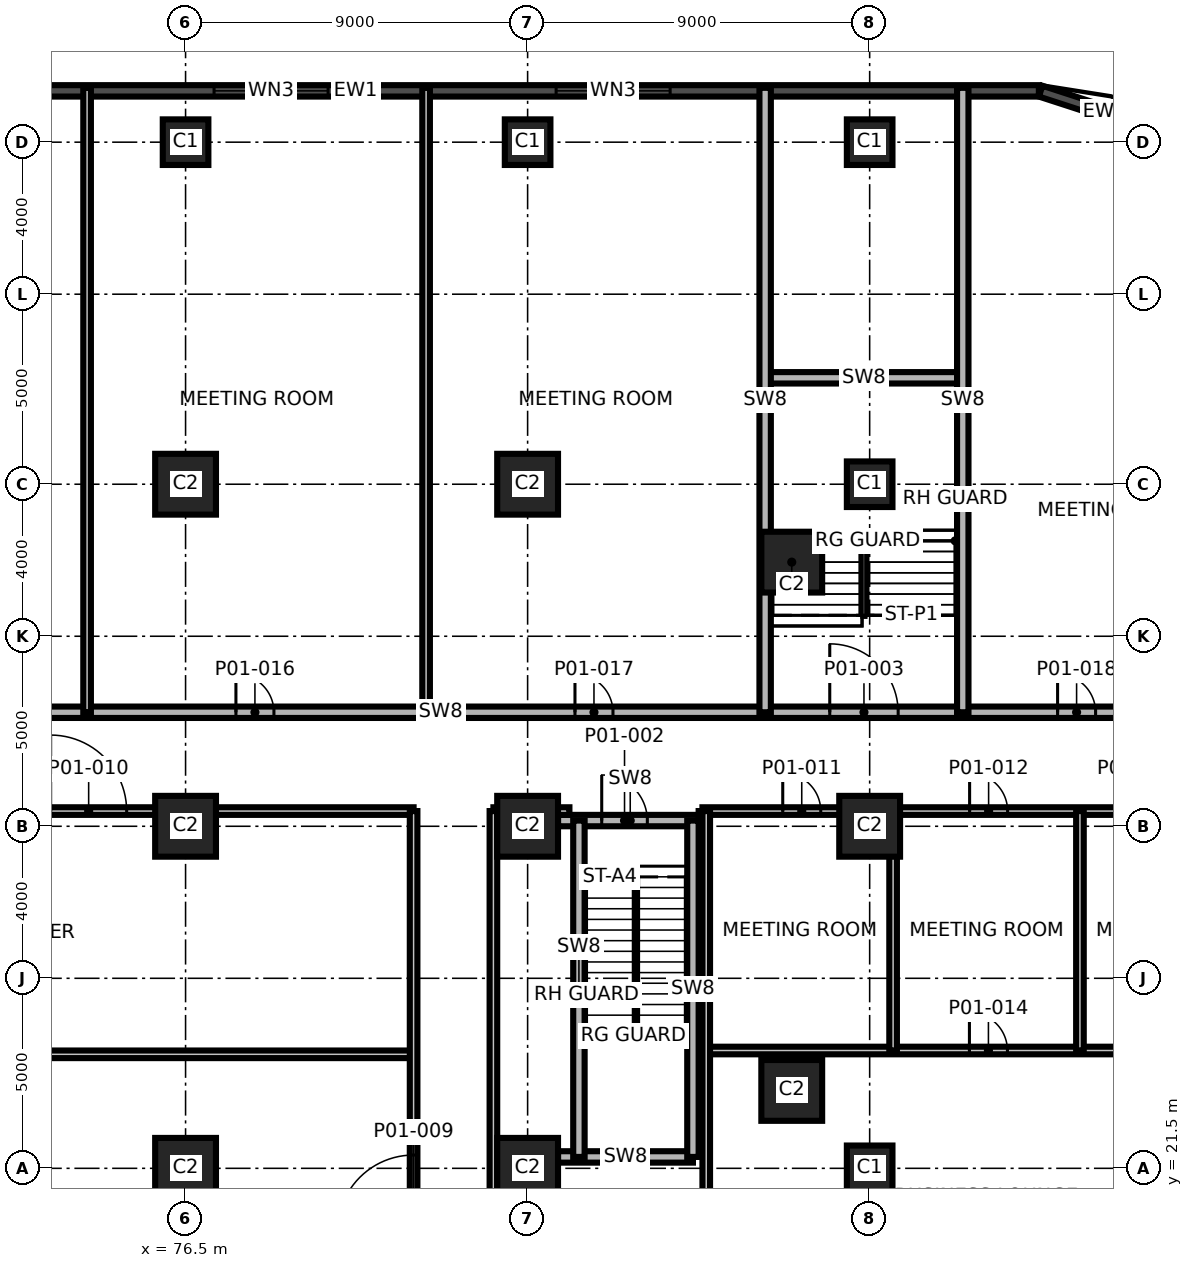
"""IFC4 building model, lengths in metres.
Left out: names, types, materials, properties, quantities, classifications, styles, units other than length and angle.
Written with IfcOpenShell. Run it as: python <this file> out.ifc"""

import sys

from ifc_helpers import new_model, si_unit, direction, frame, frame_2d, origin, origin_2d, place, context, subcontext, project, spatial, rectangle, extrude, element, fill, save


model = new_model("IFC4")
c1 = context("Model", 3, precision=1e-05, world=origin(), true_north=direction((0.0, 1.0)))
c2 = subcontext(c1, "Body", "Model", "MODEL_VIEW")
j1 = project(units=[si_unit("LENGTHUNIT", "METRE"), si_unit("PLANEANGLEUNIT", "RADIAN")], contexts=[c1])
p1 = place(None, origin())
s1 = spatial("IfcSite", under=j1, at=p1, CompositionType="ELEMENT")
p2 = place(p1, origin())
s2 = spatial("IfcBuilding", under=s1, at=p2, CompositionType="ELEMENT")
p3 = place(p2, frame((0.0, 0.0, 8.0)))
s3 = spatial("IfcBuildingStorey", under=s2, at=p3, CompositionType="ELEMENT", Elevation=8.0)
for number, where, z_axis, x_axis in (
    (1, (76.5, 21.5, 0.0), (0.0, 0.0, 1.0), (1.0, 0.0, 0.0)),
    (2, (85.5, 21.5, 0.0), (0.0, 0.0, 1.0), (1.0, 0.0, 0.0)),
):
    element("IfcColumn", number, at=place(p3, frame(where, z_axis=z_axis, x_axis=x_axis)), inside=s3, PredefinedType="COLUMN", context=c2, shape_type="SweptSolid", body=[
        extrude(rectangle(XDim=1.6, YDim=1.6, at=origin_2d()), origin(), (0.0, 0.0, 1.0), 5.5),
    ])
p4 = place(p3, frame((94.5, 21.5, 0.0), z_axis=(0.0, 0.0, 1.0), x_axis=(1.0, 0.0, 0.0)))
e3 = element("IfcColumn", 3, at=p4, inside=s3, PredefinedType="COLUMN", context=c2, shape_type="SweptSolid", body=[
    extrude(rectangle(XDim=1.2, YDim=1.2, at=origin_2d()), origin(), (0.0, 0.0, 1.0), 5.5),
])
for number, where, z_axis, x_axis in (
    (4, (76.5, 30.5, 0.0), (0.0, 0.0, 1.0), (1.0, 0.0, 0.0)),
    (5, (85.5, 30.5, 0.0), (0.0, 0.0, 1.0), (1.0, 0.0, 0.0)),
    (6, (94.5, 30.5, 0.0), (0.0, 0.0, 1.0), (1.0, 0.0, 0.0)),
    (7, (76.5, 39.5, 0.0), (0.0, 0.0, 1.0), (1.0, 0.0, 0.0)),
    (8, (85.5, 39.5, 0.0), (0.0, 0.0, 1.0), (1.0, 0.0, 0.0)),
):
    element("IfcColumn", number, at=place(p3, frame(where, z_axis=z_axis, x_axis=x_axis)), inside=s3, PredefinedType="COLUMN", context=c2, shape_type="SweptSolid", body=[
        extrude(rectangle(XDim=1.6, YDim=1.6, at=origin_2d()), origin(), (0.0, 0.0, 1.0), 5.5),
    ])
for number, where, z_axis, x_axis in (
    (9, (94.5, 39.5, 0.0), (0.0, 0.0, 1.0), (1.0, 0.0, 0.0)),
    (10, (76.5, 48.5, 0.0), (0.0, 0.0, 1.0), (1.0, 0.0, 0.0)),
    (11, (85.5, 48.5, 0.0), (0.0, 0.0, 1.0), (1.0, 0.0, 0.0)),
    (12, (94.5, 48.5, 0.0), (0.0, 0.0, 1.0), (1.0, 0.0, 0.0)),
):
    element("IfcColumn", number, at=place(p3, frame(where, z_axis=z_axis, x_axis=x_axis)), inside=s3, PredefinedType="COLUMN", context=c2, shape_type="SweptSolid", body=[
        extrude(rectangle(XDim=1.2, YDim=1.2, at=origin_2d()), origin(), (0.0, 0.0, 1.0), 5.5),
    ])
for number, where, z_axis, x_axis in (
    (13, (92.45, 23.55, 0.0), (0.0, 0.0, 1.0), (1.0, 0.0, 0.0)),
    (14, (92.45, 37.45, 0.0), (0.0, 0.0, 1.0), (1.0, 0.0, 0.0)),
):
    element("IfcColumn", number, at=place(p3, frame(where, z_axis=z_axis, x_axis=x_axis)), inside=s3, PredefinedType="COLUMN", context=c2, shape_type="SweptSolid", body=[
        extrude(rectangle(XDim=1.6, YDim=1.6, at=origin_2d()), origin(), (0.0, 0.0, 1.0), 5.5),
    ])
p5 = place(p3, frame((102.362, 48.75, 0.0), z_axis=(0.0, 0.0, 1.0), x_axis=(-0.951038127287, 0.309073584194, 0.0)))
e15 = element("IfcWall", 15, at=p5, inside=s3, PredefinedType="SOLIDWALL", context=c2, shape_type="SweptSolid", body=[
    extrude(rectangle(XDim=3.536, YDim=0.3, at=frame_2d((1.768, 0.0))), origin(), (0.0, 0.0, 1.0), 5.2),
])
p6 = place(p3, frame((98.952, 49.85, 0.0), z_axis=(0.0, 0.0, 1.0), x_axis=(-1.0, 0.0, 0.0)))
e16 = element("IfcWall", 16, at=p6, inside=s3, PredefinedType="SOLIDWALL", context=c2, shape_type="SweptSolid", body=[
    extrude(rectangle(XDim=35.952, YDim=0.3, at=frame_2d((17.976, 0.0))), origin(), (0.0, 0.0, 1.0), 5.2),
])
p7 = place(p6, frame((9.702, 0.0, 0.9)))
e17 = element("IfcOpeningElement", 17, at=p7, cuts=e16, PredefinedType="OPENING", context=c2, shape_type="SweptSolid", body=[
    extrude(rectangle(XDim=3.0, YDim=2.4, at=frame_2d((1.5, 1.2))), frame((0.0, 0.16, 0.0), z_axis=(0.0, -1.0, 0.0), x_axis=(1.0, 0.0, 0.0)), (0.0, 0.0, 1.0), 0.32),
])
p8 = place(p6, frame((18.702, 0.0, 0.9)))
e18 = element("IfcOpeningElement", 18, at=p8, cuts=e16, PredefinedType="OPENING", context=c2, shape_type="SweptSolid", body=[
    extrude(rectangle(XDim=3.0, YDim=2.4, at=frame_2d((1.5, 1.2))), frame((0.0, 0.16, 0.0), z_axis=(0.0, -1.0, 0.0), x_axis=(1.0, 0.0, 0.0)), (0.0, 0.0, 1.0), 0.32),
])
p9 = place(p6, frame((27.702, 0.0, 0.9)))
e19 = element("IfcOpeningElement", 19, at=p9, cuts=e16, PredefinedType="OPENING", context=c2, shape_type="SweptSolid", body=[
    extrude(rectangle(XDim=3.0, YDim=2.4, at=frame_2d((1.5, 1.2))), frame((0.0, 0.16, 0.0), z_axis=(0.0, -1.0, 0.0), x_axis=(1.0, 0.0, 0.0)), (0.0, 0.0, 1.0), 0.32),
])
p10 = place(p6, frame((32.226, 0.0, 0.9)))
e20 = element("IfcOpeningElement", 20, at=p10, cuts=e16, PredefinedType="OPENING", context=c2, shape_type="SweptSolid", body=[
    extrude(rectangle(XDim=3.0, YDim=2.4, at=frame_2d((1.5, 1.2))), frame((0.0, 0.16, 0.0), z_axis=(0.0, -1.0, 0.0), x_axis=(1.0, 0.0, 0.0)), (0.0, 0.0, 1.0), 0.32),
])
p11 = place(p3, frame((86.3, 21.8, 0.0), z_axis=(0.0, 0.0, 1.0), x_axis=(1.0, 0.0, 0.0)))
e21 = element("IfcWall", 21, at=p11, inside=s3, PredefinedType="SHEAR", context=c2, shape_type="SweptSolid", body=[
    extrude(rectangle(XDim=3.55, YDim=0.3, at=frame_2d((1.775, 0.0))), origin(), (0.0, 0.0, 1.0), 5.2),
])
p12 = place(p3, frame((59.05, 24.5, 0.0), z_axis=(0.0, 0.0, 1.0), x_axis=(1.0, 0.0, 0.0)))
e22 = element("IfcWall", 22, at=p12, inside=s3, PredefinedType="PARTITIONING", context=c2, shape_type="SweptSolid", body=[
    extrude(rectangle(XDim=23.45, YDim=0.2, at=frame_2d((11.725, 0.0))), origin(), (0.0, 0.0, 1.0), 5.2),
])
p13 = place(p12, frame((10.8, 0.0, 0.0)))
e23 = element("IfcOpeningElement", 23, at=p13, cuts=e22, PredefinedType="OPENING", context=c2, shape_type="SweptSolid", body=[
    extrude(rectangle(XDim=2.0, YDim=2.1, at=frame_2d((1.0, 1.05))), frame((0.0, 0.11, 0.0), z_axis=(0.0, -1.0, 0.0), x_axis=(1.0, 0.0, 0.0)), (0.0, 0.0, 1.0), 0.22),
])
p14 = place(p3, frame((90.2, 24.6, 0.0), z_axis=(0.0, 0.0, 1.0), x_axis=(1.0, 0.0, 0.0)))
e24 = element("IfcWall", 24, at=p14, inside=s3, PredefinedType="PARTITIONING", context=c2, shape_type="SweptSolid", body=[
    extrude(rectangle(XDim=14.73, YDim=0.2, at=frame_2d((7.365, 0.0))), origin(), (0.0, 0.0, 1.0), 5.2),
])
p15 = place(p14, frame((6.925, 0.0, 0.0)))
e25 = element("IfcOpeningElement", 25, at=p15, cuts=e24, PredefinedType="OPENING", context=c2, shape_type="SweptSolid", body=[
    extrude(rectangle(XDim=1.0, YDim=2.1, at=frame_2d((0.5, 1.05))), frame((0.0, 0.11, 0.0), z_axis=(0.0, -1.0, 0.0), x_axis=(1.0, 0.0, 0.0)), (0.0, 0.0, 1.0), 0.22),
])
p16 = place(p3, frame((86.3, 30.65, 0.0), z_axis=(0.0, 0.0, 1.0), x_axis=(1.0, 0.0, 0.0)))
e26 = element("IfcWall", 26, at=p16, inside=s3, PredefinedType="SHEAR", context=c2, shape_type="SweptSolid", body=[
    extrude(rectangle(XDim=3.8, YDim=0.3, at=frame_2d((1.9, 0.0))), origin(), (0.0, 0.0, 1.0), 5.2),
])
p17 = place(p16, frame((1.15, 0.0, 0.0)))
e27 = element("IfcOpeningElement", 27, at=p17, cuts=e26, PredefinedType="OPENING", context=c2, shape_type="SweptSolid", body=[
    extrude(rectangle(XDim=1.2, YDim=2.1, at=frame_2d((0.6, 1.05))), frame((0.0, 0.16, 0.0), z_axis=(0.0, -1.0, 0.0), x_axis=(1.0, 0.0, 0.0)), (0.0, 0.0, 1.0), 0.32),
])
p18 = place(p3, frame((58.97, 30.9, 0.0), z_axis=(0.0, 0.0, 1.0), x_axis=(1.0, 0.0, 0.0)))
e28 = element("IfcWall", 28, at=p18, inside=s3, PredefinedType="PARTITIONING", context=c2, shape_type="SweptSolid", body=[
    extrude(rectangle(XDim=23.53, YDim=0.2, at=frame_2d((11.765, 0.0))), origin(), (0.0, 0.0, 1.0), 5.2),
])
p19 = place(p18, frame((13.98, 0.0, 0.0)))
e29 = element("IfcOpeningElement", 29, at=p19, cuts=e28, PredefinedType="OPENING", context=c2, shape_type="SweptSolid", body=[
    extrude(rectangle(XDim=2.0, YDim=2.4, at=frame_2d((1.0, 1.2))), frame((0.0, 0.11, 0.0), z_axis=(0.0, -1.0, 0.0), x_axis=(1.0, 0.0, 0.0)), (0.0, 0.0, 1.0), 0.22),
])
p20 = place(p3, frame((84.6, 30.9, 0.0), z_axis=(0.0, 0.0, 1.0), x_axis=(1.0, 0.0, 0.0)))
e30 = element("IfcWall", 30, at=p20, inside=s3, PredefinedType="PARTITIONING", context=c2, shape_type="SweptSolid", body=[
    extrude(rectangle(XDim=2.0, YDim=0.2, at=frame_2d((1.0, 0.0))), origin(), (0.0, 0.0, 1.0), 5.2),
])
p21 = place(p3, frame((90.1, 30.9, 0.0), z_axis=(0.0, 0.0, 1.0), x_axis=(1.0, 0.0, 0.0)))
e31 = element("IfcWall", 31, at=p21, inside=s3, PredefinedType="PARTITIONING", context=c2, shape_type="SweptSolid", body=[
    extrude(rectangle(XDim=14.83, YDim=0.2, at=frame_2d((7.415, 0.0))), origin(), (0.0, 0.0, 1.0), 5.2),
])
p22 = place(p21, frame((2.113, 0.0, 0.0)))
e32 = element("IfcOpeningElement", 32, at=p22, cuts=e31, PredefinedType="OPENING", context=c2, shape_type="SweptSolid", body=[
    extrude(rectangle(XDim=1.0, YDim=2.1, at=frame_2d((0.5, 1.05))), frame((0.0, 0.11, 0.0), z_axis=(0.0, -1.0, 0.0), x_axis=(1.0, 0.0, 0.0)), (0.0, 0.0, 1.0), 0.22),
])
p23 = place(p21, frame((7.03, 0.0, 0.0)))
e33 = element("IfcOpeningElement", 33, at=p23, cuts=e31, PredefinedType="OPENING", context=c2, shape_type="SweptSolid", body=[
    extrude(rectangle(XDim=1.0, YDim=2.1, at=frame_2d((0.5, 1.05))), frame((0.0, 0.11, 0.0), z_axis=(0.0, -1.0, 0.0), x_axis=(1.0, 0.0, 0.0)), (0.0, 0.0, 1.0), 0.22),
])
p24 = place(p21, frame((10.935, 0.0, 0.0)))
e34 = element("IfcOpeningElement", 34, at=p24, cuts=e31, PredefinedType="OPENING", context=c2, shape_type="SweptSolid", body=[
    extrude(rectangle(XDim=1.0, YDim=2.1, at=frame_2d((0.5, 1.05))), frame((0.0, 0.11, 0.0), z_axis=(0.0, -1.0, 0.0), x_axis=(1.0, 0.0, 0.0)), (0.0, 0.0, 1.0), 0.22),
])
p25 = place(p3, frame((61.5, 33.5, 0.0), z_axis=(0.0, 0.0, 1.0), x_axis=(1.0, 0.0, 0.0)))
e35 = element("IfcWall", 35, at=p25, inside=s3, PredefinedType="SHEAR", context=c2, shape_type="SweptSolid", body=[
    extrude(rectangle(XDim=43.43, YDim=0.3, at=frame_2d((21.715, 0.0))), origin(), (0.0, 0.0, 1.0), 5.2),
])
p26 = place(p25, frame((31.95, 0.0, 0.0)))
e36 = element("IfcOpeningElement", 36, at=p26, cuts=e35, PredefinedType="OPENING", context=c2, shape_type="SweptSolid", body=[
    extrude(rectangle(XDim=1.8, YDim=2.1, at=frame_2d((0.9, 1.05))), frame((0.0, 0.16, 0.0), z_axis=(0.0, -1.0, 0.0), x_axis=(1.0, 0.0, 0.0)), (0.0, 0.0, 1.0), 0.32),
])
p27 = place(p25, frame((0.2, 0.0, 0.0)))
e37 = element("IfcOpeningElement", 37, at=p27, cuts=e35, PredefinedType="OPENING", context=c2, shape_type="SweptSolid", body=[
    extrude(rectangle(XDim=1.0, YDim=2.1, at=frame_2d((0.5, 1.05))), frame((0.0, 0.16, 0.0), z_axis=(0.0, -1.0, 0.0), x_axis=(1.0, 0.0, 0.0)), (0.0, 0.0, 1.0), 0.32),
])
p28 = place(p25, frame((16.325, 0.0, 0.0)))
e38 = element("IfcOpeningElement", 38, at=p28, cuts=e35, PredefinedType="OPENING", context=c2, shape_type="SweptSolid", body=[
    extrude(rectangle(XDim=1.0, YDim=2.1, at=frame_2d((0.5, 1.05))), frame((0.0, 0.16, 0.0), z_axis=(0.0, -1.0, 0.0), x_axis=(1.0, 0.0, 0.0)), (0.0, 0.0, 1.0), 0.32),
])
p29 = place(p25, frame((25.246, 0.0, 0.0)))
e39 = element("IfcOpeningElement", 39, at=p29, cuts=e35, PredefinedType="OPENING", context=c2, shape_type="SweptSolid", body=[
    extrude(rectangle(XDim=1.0, YDim=2.1, at=frame_2d((0.5, 1.05))), frame((0.0, 0.16, 0.0), z_axis=(0.0, -1.0, 0.0), x_axis=(1.0, 0.0, 0.0)), (0.0, 0.0, 1.0), 0.32),
])
p30 = place(p25, frame((37.945, 0.0, 0.0)))
e40 = element("IfcOpeningElement", 40, at=p30, cuts=e35, PredefinedType="OPENING", context=c2, shape_type="SweptSolid", body=[
    extrude(rectangle(XDim=1.0, YDim=2.1, at=frame_2d((0.5, 1.05))), frame((0.0, 0.16, 0.0), z_axis=(0.0, -1.0, 0.0), x_axis=(1.0, 0.0, 0.0)), (0.0, 0.0, 1.0), 0.32),
])
p31 = place(p3, frame((91.75, 42.3, 0.0), z_axis=(0.0, 0.0, 1.0), x_axis=(1.0, 0.0, 0.0)))
e41 = element("IfcWall", 41, at=p31, inside=s3, PredefinedType="SHEAR", context=c2, shape_type="SweptSolid", body=[
    extrude(rectangle(XDim=5.2, YDim=0.3, at=frame_2d((2.6, 0.0))), origin(), (0.0, 0.0, 1.0), 5.2),
])
p32 = place(p3, frame((100.033, 24.6, 0.0), z_axis=(0.0, 0.0, 1.0), x_axis=(0.0, 1.0, 0.0)))
e42 = element("IfcWall", 42, at=p32, inside=s3, PredefinedType="PARTITIONING", context=c2, shape_type="SweptSolid", body=[
    extrude(rectangle(XDim=6.3, YDim=0.2, at=frame_2d((3.15, 0.0))), origin(), (0.0, 0.0, 1.0), 5.2),
])
p33 = place(p3, frame((73.909, 33.5, 0.0), z_axis=(0.0, 0.0, 1.0), x_axis=(0.0, 1.0, 0.0)))
e43 = element("IfcWall", 43, at=p33, inside=s3, PredefinedType="PARTITIONING", context=c2, shape_type="SweptSolid", body=[
    extrude(rectangle(XDim=16.43, YDim=0.2, at=frame_2d((8.215, 0.0))), origin(), (0.0, 0.0, 1.0), 5.2),
])
p34 = place(p3, frame((82.5, 11.07, 0.0), z_axis=(0.0, 0.0, 1.0), x_axis=(0.0, 1.0, 0.0)))
e44 = element("IfcWall", 44, at=p34, inside=s3, PredefinedType="PARTITIONING", context=c2, shape_type="SweptSolid", body=[
    extrude(rectangle(XDim=19.83, YDim=0.2, at=frame_2d((9.915, 0.0))), origin(), (0.0, 0.0, 1.0), 5.2),
])
p35 = place(p34, frame((8.78, 0.0, 0.0)))
e45 = element("IfcOpeningElement", 45, at=p35, cuts=e44, PredefinedType="OPENING", context=c2, shape_type="SweptSolid", body=[
    extrude(rectangle(XDim=2.0, YDim=2.4, at=frame_2d((1.0, 1.2))), frame((0.0, 0.11, 0.0), z_axis=(0.0, -1.0, 0.0), x_axis=(1.0, 0.0, 0.0)), (0.0, 0.0, 1.0), 0.22),
])
p36 = place(p3, frame((82.829, 33.5, 0.0), z_axis=(0.0, 0.0, 1.0), x_axis=(0.0, 1.0, 0.0)))
e46 = element("IfcWall", 46, at=p36, inside=s3, PredefinedType="PARTITIONING", context=c2, shape_type="SweptSolid", body=[
    extrude(rectangle(XDim=16.43, YDim=0.2, at=frame_2d((8.215, 0.0))), origin(), (0.0, 0.0, 1.0), 5.2),
])
p37 = place(p3, frame((84.6, 17.4, 0.0), z_axis=(0.0, 0.0, 1.0), x_axis=(0.0, 1.0, 0.0)))
e47 = element("IfcWall", 47, at=p37, inside=s3, PredefinedType="PARTITIONING", context=c2, shape_type="SweptSolid", body=[
    extrude(rectangle(XDim=13.5, YDim=0.2, at=frame_2d((6.75, 0.0))), origin(), (0.0, 0.0, 1.0), 5.2),
])
for number, where, z_axis, x_axis in (
    (48, (86.85, 21.8, 0.0), (0.0, 0.0, 1.0), (0.0, 1.0, 0.0)),
    (49, (89.85, 21.8, 0.0), (0.0, 0.0, 1.0), (0.0, 1.0, 0.0)),
):
    element("IfcWall", number, at=place(p3, frame(where, z_axis=z_axis, x_axis=x_axis)), inside=s3, PredefinedType="SHEAR", context=c2, shape_type="SweptSolid", body=[
        extrude(rectangle(XDim=8.85, YDim=0.3, at=frame_2d((4.425, 0.0))), origin(), (0.0, 0.0, 1.0), 5.2),
    ])
p38 = place(p3, frame((90.1, 30.65, 0.0), z_axis=(0.0, 0.0, 1.0), x_axis=(0.0, 1.0, 0.0)))
e50 = element("IfcWall", 50, at=p38, inside=s3, PredefinedType="PARTITIONING", context=c2, shape_type="SweptSolid", body=[
    extrude(rectangle(XDim=0.25, YDim=0.2, at=frame_2d((0.125, 0.0))), origin(), (0.0, 0.0, 1.0), 5.2),
])
p39 = place(p3, frame((90.2, 11.07, 0.0), z_axis=(0.0, 0.0, 1.0), x_axis=(0.0, 1.0, 0.0)))
e51 = element("IfcWall", 51, at=p39, inside=s3, PredefinedType="PARTITIONING", context=c2, shape_type="SweptSolid", body=[
    extrude(rectangle(XDim=19.83, YDim=0.2, at=frame_2d((9.915, 0.0))), origin(), (0.0, 0.0, 1.0), 5.2),
])
p40 = place(p3, frame((91.75, 33.5, 0.0), z_axis=(0.0, 0.0, 1.0), x_axis=(0.0, 1.0, 0.0)))
e52 = element("IfcWall", 52, at=p40, inside=s3, PredefinedType="SHEAR", context=c2, shape_type="SweptSolid", body=[
    extrude(rectangle(XDim=16.43, YDim=0.3, at=frame_2d((8.215, 0.0))), origin(), (0.0, 0.0, 1.0), 5.2),
])
p41 = place(p3, frame((95.117, 24.6, 0.0), z_axis=(0.0, 0.0, 1.0), x_axis=(0.0, 1.0, 0.0)))
e53 = element("IfcWall", 53, at=p41, inside=s3, PredefinedType="PARTITIONING", context=c2, shape_type="SweptSolid", body=[
    extrude(rectangle(XDim=6.3, YDim=0.2, at=frame_2d((3.15, 0.0))), origin(), (0.0, 0.0, 1.0), 5.2),
])
p42 = place(p3, frame((96.95, 33.5, 0.0), z_axis=(0.0, 0.0, 1.0), x_axis=(0.0, 1.0, 0.0)))
e54 = element("IfcWall", 54, at=p42, inside=s3, PredefinedType="SHEAR", context=c2, shape_type="SweptSolid", body=[
    extrude(rectangle(XDim=16.43, YDim=0.3, at=frame_2d((8.215, 0.0))), origin(), (0.0, 0.0, 1.0), 5.2),
])
p43 = place(p7, origin())
e55 = element("IfcWindow", 55, at=p43, inside=s3, PartitioningType="SINGLE_PANEL", PredefinedType="WINDOW", context=c2, shape_type="SweptSolid", body=[
    extrude(rectangle(XDim=3.0, YDim=2.4, at=frame_2d((1.5, 1.2))), frame((0.0, 0.03, 0.0), z_axis=(0.0, -1.0, 0.0), x_axis=(1.0, 0.0, 0.0)), (0.0, 0.0, 1.0), 0.06),
])
fill(e17, e55)
p44 = place(p8, origin())
e56 = element("IfcWindow", 56, at=p44, inside=s3, PartitioningType="SINGLE_PANEL", PredefinedType="WINDOW", context=c2, shape_type="SweptSolid", body=[
    extrude(rectangle(XDim=3.0, YDim=2.4, at=frame_2d((1.5, 1.2))), frame((0.0, 0.03, 0.0), z_axis=(0.0, -1.0, 0.0), x_axis=(1.0, 0.0, 0.0)), (0.0, 0.0, 1.0), 0.06),
])
fill(e18, e56)
p45 = place(p17, origin())
e57 = element("IfcDoor", 57, at=p45, inside=s3, OperationType="SINGLE_SWING_RIGHT", PredefinedType="DOOR", context=c2, shape_type="SweptSolid", body=[
    extrude(rectangle(XDim=1.2, YDim=2.1, at=frame_2d((0.6, 1.05))), frame((0.0, 0.025, 0.0), z_axis=(0.0, -1.0, 0.0), x_axis=(1.0, 0.0, 0.0)), (0.0, 0.0, 1.0), 0.05),
])
fill(e27, e57)
p46 = place(p26, origin())
e58 = element("IfcDoor", 58, at=p46, inside=s3, OperationType="SINGLE_SWING_LEFT", PredefinedType="DOOR", context=c2, shape_type="SweptSolid", body=[
    extrude(rectangle(XDim=1.8, YDim=2.1, at=frame_2d((0.9, 1.05))), frame((0.0, 0.025, 0.0), z_axis=(0.0, -1.0, 0.0), x_axis=(1.0, 0.0, 0.0)), (0.0, 0.0, 1.0), 0.05),
])
fill(e36, e58)
p47 = place(p35, origin())
e59 = element("IfcDoor", 59, at=p47, inside=s3, OperationType="SINGLE_SWING_LEFT", PredefinedType="DOOR", context=c2, shape_type="SweptSolid", body=[
    extrude(rectangle(XDim=2.0, YDim=2.4, at=frame_2d((1.0, 1.2))), frame((0.0, 0.025, 0.0), z_axis=(0.0, -1.0, 0.0), x_axis=(1.0, 0.0, 0.0)), (0.0, 0.0, 1.0), 0.05),
])
fill(e45, e59)
p48 = place(p19, origin())
e60 = element("IfcDoor", 60, at=p48, inside=s3, OperationType="SINGLE_SWING_RIGHT", PredefinedType="DOOR", context=c2, shape_type="SweptSolid", body=[
    extrude(rectangle(XDim=2.0, YDim=2.4, at=frame_2d((1.0, 1.2))), frame((0.0, 0.025, 0.0), z_axis=(0.0, -1.0, 0.0), x_axis=(1.0, 0.0, 0.0)), (0.0, 0.0, 1.0), 0.05),
])
fill(e29, e60)
p49 = place(p22, origin())
e61 = element("IfcDoor", 61, at=p49, inside=s3, OperationType="SINGLE_SWING_LEFT", PredefinedType="DOOR", context=c2, shape_type="SweptSolid", body=[
    extrude(rectangle(XDim=1.0, YDim=2.1, at=frame_2d((0.5, 1.05))), frame((0.0, 0.025, 0.0), z_axis=(0.0, -1.0, 0.0), x_axis=(1.0, 0.0, 0.0)), (0.0, 0.0, 1.0), 0.05),
])
fill(e32, e61)
p50 = place(p23, origin())
e62 = element("IfcDoor", 62, at=p50, inside=s3, OperationType="SINGLE_SWING_RIGHT", PredefinedType="DOOR", context=c2, shape_type="SweptSolid", body=[
    extrude(rectangle(XDim=1.0, YDim=2.1, at=frame_2d((0.5, 1.05))), frame((0.0, 0.025, 0.0), z_axis=(0.0, -1.0, 0.0), x_axis=(1.0, 0.0, 0.0)), (0.0, 0.0, 1.0), 0.05),
])
fill(e33, e62)
p51 = place(p15, origin())
e63 = element("IfcDoor", 63, at=p51, inside=s3, OperationType="SINGLE_SWING_RIGHT", PredefinedType="DOOR", context=c2, shape_type="SweptSolid", body=[
    extrude(rectangle(XDim=1.0, YDim=2.1, at=frame_2d((0.5, 1.05))), frame((0.0, 0.025, 0.0), z_axis=(0.0, -1.0, 0.0), x_axis=(1.0, 0.0, 0.0)), (0.0, 0.0, 1.0), 0.05),
])
fill(e25, e63)
p52 = place(p28, origin())
e64 = element("IfcDoor", 64, at=p52, inside=s3, OperationType="SINGLE_SWING_RIGHT", PredefinedType="DOOR", context=c2, shape_type="SweptSolid", body=[
    extrude(rectangle(XDim=1.0, YDim=2.1, at=frame_2d((0.5, 1.05))), frame((0.0, 0.025, 0.0), z_axis=(0.0, -1.0, 0.0), x_axis=(1.0, 0.0, 0.0)), (0.0, 0.0, 1.0), 0.05),
])
fill(e38, e64)
p53 = place(p29, origin())
e65 = element("IfcDoor", 65, at=p53, inside=s3, OperationType="SINGLE_SWING_LEFT", PredefinedType="DOOR", context=c2, shape_type="SweptSolid", body=[
    extrude(rectangle(XDim=1.0, YDim=2.1, at=frame_2d((0.5, 1.05))), frame((0.0, 0.025, 0.0), z_axis=(0.0, -1.0, 0.0), x_axis=(1.0, 0.0, 0.0)), (0.0, 0.0, 1.0), 0.05),
])
fill(e39, e65)
p54 = place(p30, origin())
e66 = element("IfcDoor", 66, at=p54, inside=s3, OperationType="SINGLE_SWING_RIGHT", PredefinedType="DOOR", context=c2, shape_type="SweptSolid", body=[
    extrude(rectangle(XDim=1.0, YDim=2.1, at=frame_2d((0.5, 1.05))), frame((0.0, 0.025, 0.0), z_axis=(0.0, -1.0, 0.0), x_axis=(1.0, 0.0, 0.0)), (0.0, 0.0, 1.0), 0.05),
])
fill(e40, e66)
save(model, sys.argv[1])
